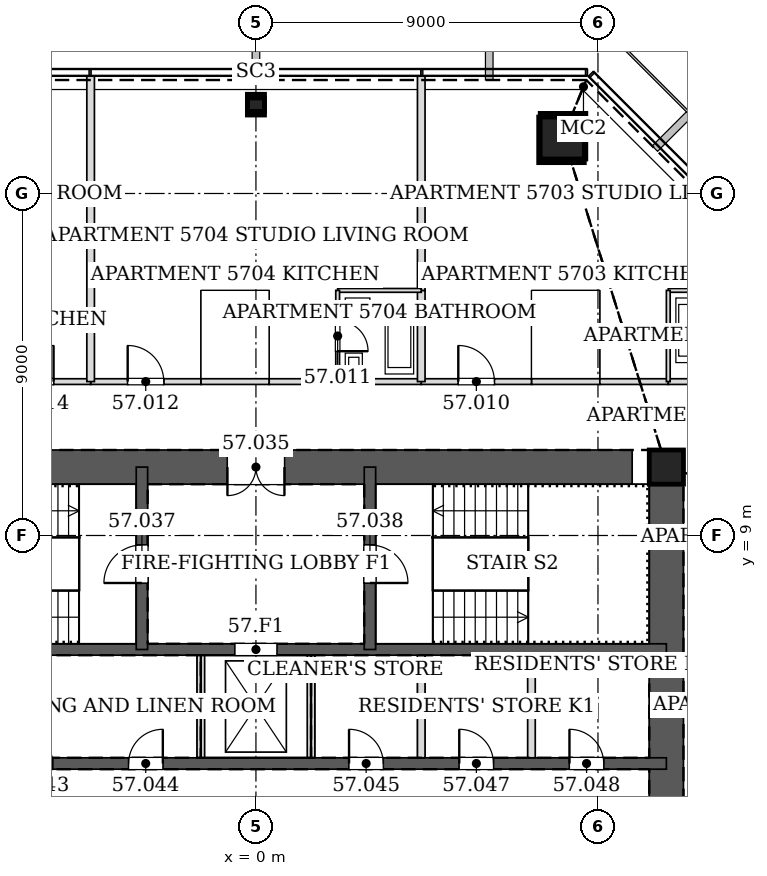
"""IFC4 building model, lengths in metres.
Left out: names, types, materials, properties, quantities, classifications, styles, units other than length and angle.
Written with IfcOpenShell. Run it as: python <this file> out.ifc"""

import sys

from ifc_helpers import new_model, si_unit, direction, frame, frame_2d, origin, origin_2d, place, context, subcontext, project, spatial, rectangle, hollow_rectangle, extrude, element, fill, save


model = new_model("IFC4")
c1 = context("Model", 3, precision=1e-05, world=origin(), true_north=direction((0.0, 1.0)))
c2 = subcontext(c1, "Body", "Model", "MODEL_VIEW")
j1 = project(units=[si_unit("LENGTHUNIT", "METRE"), si_unit("PLANEANGLEUNIT", "RADIAN")], contexts=[c1])
p1 = place(None, origin())
s1 = spatial("IfcSite", under=j1, at=p1, CompositionType="ELEMENT")
p2 = place(p1, origin())
s2 = spatial("IfcBuilding", under=s1, at=p2, CompositionType="ELEMENT")
p3 = place(p2, frame((0.0, 0.0, 241.4)))
s3 = spatial("IfcBuildingStorey", under=s2, at=p3, CompositionType="ELEMENT", Elevation=241.4)
p4 = place(p3, frame((8.08, 19.508, 0.0), z_axis=(-0.011698403216, -0.028277121884, 0.999531666202), x_axis=(0.924045401938, -0.382282742426, 0.0)))
e1 = element("IfcColumn", 1, at=p4, inside=s3, PredefinedType="COLUMN", context=c2, shape_type="SweptSolid", body=[
    extrude(hollow_rectangle(XDim=1.2, YDim=1.2, WallThickness=0.055, at=origin_2d()), origin(), (0.0, 0.0, 1.0), 3.402),
])
p5 = place(p3, frame((0.0, 20.386, 0.0), z_axis=(0.0, -0.028207339906, 0.999602093823), x_axis=(1.0, 0.0, 0.0)))
e2 = element("IfcColumn", 2, at=p5, inside=s3, PredefinedType="COLUMN", context=c2, shape_type="SweptSolid", body=[
    extrude(hollow_rectangle(XDim=0.45, YDim=0.45, WallThickness=0.02, at=origin_2d()), origin(), (0.0, 0.0, 1.0), 3.402),
])
p6 = place(p3, frame((10.8, 10.8, 0.0), z_axis=(0.0, 0.0, 1.0), x_axis=(1.0, 0.0, 0.0)))
e3 = element("IfcColumn", 3, at=p6, inside=s3, PredefinedType="COLUMN", context=c2, shape_type="SweptSolid", body=[
    extrude(hollow_rectangle(XDim=0.9, YDim=0.9, WallThickness=0.04, at=origin_2d()), origin(), (0.0, 0.0, 1.0), 3.4),
])
p7 = place(p3, frame((10.8, -10.8, 0.0), z_axis=(0.0, 0.0, 1.0), x_axis=(0.0, 1.0, 0.0)))
e4 = element("IfcWall", 4, at=p7, inside=s3, PredefinedType="SOLIDWALL", context=c2, shape_type="SweptSolid", body=[
    extrude(rectangle(XDim=21.6, YDim=0.9, at=frame_2d((10.8, 0.0))), origin(), (0.0, 0.0, 1.0), 3.4),
])
p8 = place(p7, frame((11.7, 0.0, 0.0)))
e5 = element("IfcOpeningElement", 5, at=p8, cuts=e4, PredefinedType="OPENING", context=c2, shape_type="SweptSolid", body=[
    extrude(rectangle(XDim=1.2, YDim=2.1, at=frame_2d((0.6, 1.05))), frame((0.0, 0.46, 0.0), z_axis=(0.0, -1.0, 0.0), x_axis=(1.0, 0.0, 0.0)), (0.0, 0.0, 1.0), 0.92),
])
p9 = place(p7, frame((8.7, 0.0, 0.0)))
e6 = element("IfcOpeningElement", 6, at=p9, cuts=e4, PredefinedType="OPENING", context=c2, shape_type="SweptSolid", body=[
    extrude(rectangle(XDim=1.2, YDim=2.1, at=frame_2d((0.6, 1.05))), frame((0.0, 0.46, 0.0), z_axis=(0.0, -1.0, 0.0), x_axis=(1.0, 0.0, 0.0)), (0.0, 0.0, 1.0), 0.92),
])
p10 = place(p3, frame((10.8, 10.8, 0.0), z_axis=(0.0, 0.0, 1.0), x_axis=(-1.0, 0.0, 0.0)))
e7 = element("IfcWall", 7, at=p10, inside=s3, PredefinedType="SOLIDWALL", context=c2, shape_type="SweptSolid", body=[
    extrude(rectangle(XDim=21.6, YDim=0.9, at=frame_2d((10.8, 0.0))), origin(), (0.0, 0.0, 1.0), 3.4),
])
p11 = place(p10, frame((10.05, 0.0, 0.0)))
e8 = element("IfcOpeningElement", 8, at=p11, cuts=e7, PredefinedType="OPENING", context=c2, shape_type="SweptSolid", body=[
    extrude(rectangle(XDim=1.5, YDim=2.1, at=frame_2d((0.75, 1.05))), frame((0.0, 0.46, 0.0), z_axis=(0.0, -1.0, 0.0), x_axis=(1.0, 0.0, 0.0)), (0.0, 0.0, 1.0), 0.92),
])
p12 = place(p3, frame((-10.8, 3.0, 0.0), z_axis=(0.0, 0.0, 1.0), x_axis=(1.0, 0.0, 0.0)))
e9 = element("IfcWall", 9, at=p12, inside=s3, PredefinedType="SOLIDWALL", context=c2, shape_type="SweptSolid", body=[
    extrude(rectangle(XDim=21.6, YDim=0.3, at=frame_2d((10.8, 0.0))), origin(), (0.0, 0.0, 1.0), 3.4),
])
p13 = place(p12, frame((1.65, 0.0, 0.0)))
e10 = element("IfcOpeningElement", 10, at=p13, cuts=e9, PredefinedType="OPENING", context=c2, shape_type="SweptSolid", body=[
    extrude(rectangle(XDim=0.9, YDim=2.1, at=frame_2d((0.45, 1.05))), frame((0.0, 0.16, 0.0), z_axis=(0.0, -1.0, 0.0), x_axis=(1.0, 0.0, 0.0)), (0.0, 0.0, 1.0), 0.32),
])
p14 = place(p12, frame((4.55, 0.0, 0.0)))
e11 = element("IfcOpeningElement", 11, at=p14, cuts=e9, PredefinedType="OPENING", context=c2, shape_type="SweptSolid", body=[
    extrude(rectangle(XDim=0.9, YDim=2.1, at=frame_2d((0.45, 1.05))), frame((0.0, 0.16, 0.0), z_axis=(0.0, -1.0, 0.0), x_axis=(1.0, 0.0, 0.0)), (0.0, 0.0, 1.0), 0.32),
])
p15 = place(p12, frame((7.45, 0.0, 0.0)))
e12 = element("IfcOpeningElement", 12, at=p15, cuts=e9, PredefinedType="OPENING", context=c2, shape_type="SweptSolid", body=[
    extrude(rectangle(XDim=0.9, YDim=2.1, at=frame_2d((0.45, 1.05))), frame((0.0, 0.16, 0.0), z_axis=(0.0, -1.0, 0.0), x_axis=(1.0, 0.0, 0.0)), (0.0, 0.0, 1.0), 0.32),
])
p16 = place(p12, frame((13.25, 0.0, 0.0)))
e13 = element("IfcOpeningElement", 13, at=p16, cuts=e9, PredefinedType="OPENING", context=c2, shape_type="SweptSolid", body=[
    extrude(rectangle(XDim=0.9, YDim=2.1, at=frame_2d((0.45, 1.05))), frame((0.0, 0.16, 0.0), z_axis=(0.0, -1.0, 0.0), x_axis=(1.0, 0.0, 0.0)), (0.0, 0.0, 1.0), 0.32),
])
p17 = place(p12, frame((16.15, 0.0, 0.0)))
e14 = element("IfcOpeningElement", 14, at=p17, cuts=e9, PredefinedType="OPENING", context=c2, shape_type="SweptSolid", body=[
    extrude(rectangle(XDim=0.9, YDim=2.1, at=frame_2d((0.45, 1.05))), frame((0.0, 0.16, 0.0), z_axis=(0.0, -1.0, 0.0), x_axis=(1.0, 0.0, 0.0)), (0.0, 0.0, 1.0), 0.32),
])
p18 = place(p12, frame((19.05, 0.0, 0.0)))
e15 = element("IfcOpeningElement", 15, at=p18, cuts=e9, PredefinedType="OPENING", context=c2, shape_type="SweptSolid", body=[
    extrude(rectangle(XDim=0.9, YDim=2.1, at=frame_2d((0.45, 1.05))), frame((0.0, 0.16, 0.0), z_axis=(0.0, -1.0, 0.0), x_axis=(1.0, 0.0, 0.0)), (0.0, 0.0, 1.0), 0.32),
])
p19 = place(p3, frame((-10.8, 6.0, 0.0), z_axis=(0.0, 0.0, 1.0), x_axis=(1.0, 0.0, 0.0)))
e16 = element("IfcWall", 16, at=p19, inside=s3, PredefinedType="SOLIDWALL", context=c2, shape_type="SweptSolid", body=[
    extrude(rectangle(XDim=21.6, YDim=0.3, at=frame_2d((10.8, 0.0))), origin(), (0.0, 0.0, 1.0), 3.4),
])
p20 = place(p19, frame((10.25, 0.0, 0.0)))
e17 = element("IfcOpeningElement", 17, at=p20, cuts=e16, PredefinedType="OPENING", context=c2, shape_type="SweptSolid", body=[
    extrude(rectangle(XDim=1.1, YDim=2.1, at=frame_2d((0.55, 1.05))), frame((0.0, 0.16, 0.0), z_axis=(0.0, -1.0, 0.0), x_axis=(1.0, 0.0, 0.0)), (0.0, 0.0, 1.0), 0.32),
])
p21 = place(p3, frame((-3.0, 6.0, 0.0), z_axis=(0.0, 0.0, 1.0), x_axis=(0.0, 1.0, 0.0)))
e18 = element("IfcWall", 18, at=p21, inside=s3, PredefinedType="SOLIDWALL", context=c2, shape_type="SweptSolid", body=[
    extrude(rectangle(XDim=4.8, YDim=0.3, at=frame_2d((2.4, 0.0))), origin(), (0.0, 0.0, 1.0), 3.4),
])
p22 = place(p21, frame((1.75, 0.0, 0.0)))
e19 = element("IfcOpeningElement", 19, at=p22, cuts=e18, PredefinedType="OPENING", context=c2, shape_type="SweptSolid", body=[
    extrude(rectangle(XDim=1.0, YDim=2.1, at=frame_2d((0.5, 1.05))), frame((0.0, 0.16, 0.0), z_axis=(0.0, -1.0, 0.0), x_axis=(1.0, 0.0, 0.0)), (0.0, 0.0, 1.0), 0.32),
])
p23 = place(p3, frame((3.0, 6.0, 0.0), z_axis=(0.0, 0.0, 1.0), x_axis=(0.0, 1.0, 0.0)))
e20 = element("IfcWall", 20, at=p23, inside=s3, PredefinedType="SOLIDWALL", context=c2, shape_type="SweptSolid", body=[
    extrude(rectangle(XDim=4.8, YDim=0.3, at=frame_2d((2.4, 0.0))), origin(), (0.0, 0.0, 1.0), 3.4),
])
p24 = place(p23, frame((1.75, 0.0, 0.0)))
e21 = element("IfcOpeningElement", 21, at=p24, cuts=e20, PredefinedType="OPENING", context=c2, shape_type="SweptSolid", body=[
    extrude(rectangle(XDim=1.0, YDim=2.1, at=frame_2d((0.5, 1.05))), frame((0.0, 0.16, 0.0), z_axis=(0.0, -1.0, 0.0), x_axis=(1.0, 0.0, 0.0)), (0.0, 0.0, 1.0), 0.32),
])
p25 = place(p3, frame((13.05, 13.05, 0.0), z_axis=(0.0, 0.0, 1.0), x_axis=(-1.0, 0.0, 0.0)))
e22 = element("IfcWall", 22, at=p25, inside=s3, PredefinedType="PARTITIONING", context=c2, shape_type="SweptSolid", body=[
    extrude(rectangle(XDim=2.201, YDim=0.15, at=frame_2d((1.101, 0.0))), origin(), (0.0, 0.0, 1.0), 2.588),
])
p26 = place(p3, frame((9.051, 13.05, 0.0), z_axis=(0.0, 0.0, 1.0), x_axis=(-1.0, 0.0, 0.0)))
e23 = element("IfcWall", 23, at=p26, inside=s3, PredefinedType="PARTITIONING", context=c2, shape_type="SweptSolid", body=[
    extrude(rectangle(XDim=1.802, YDim=0.15, at=frame_2d((0.901, 0.0))), origin(), (0.0, 0.0, 1.0), 2.662),
])
p27 = place(p3, frame((7.251, 13.05, 0.0), z_axis=(0.0, 0.0, 1.0), x_axis=(-1.0, 0.0, 0.0)))
e24 = element("IfcWall", 24, at=p27, inside=s3, PredefinedType="PARTITIONING", context=c2, shape_type="SweptSolid", body=[
    extrude(rectangle(XDim=2.902, YDim=0.15, at=frame_2d((1.451, 0.0))), origin(), (0.0, 0.0, 1.0), 2.662),
])
p28 = place(p27, frame((0.976, 0.0, 0.0)))
e25 = element("IfcOpeningElement", 25, at=p28, cuts=e24, PredefinedType="OPENING", context=c2, shape_type="SweptSolid", body=[
    extrude(rectangle(XDim=0.95, YDim=2.1, at=frame_2d((0.475, 1.05))), frame((0.0, 0.085, 0.0), z_axis=(0.0, -1.0, 0.0), x_axis=(1.0, 0.0, 0.0)), (0.0, 0.0, 1.0), 0.17),
])
p29 = place(p3, frame((10.851, 13.05, 0.0), z_axis=(0.0, 0.0, 1.0), x_axis=(-1.0, 0.0, 0.0)))
e26 = element("IfcWall", 26, at=p29, inside=s3, PredefinedType="PARTITIONING", context=c2, shape_type="SweptSolid", body=[
    extrude(rectangle(XDim=1.802, YDim=0.15, at=frame_2d((0.901, 0.0))), origin(), (0.0, 0.0, 1.0), 2.349),
])
p30 = place(p3, frame((4.351, 13.05, 0.0), z_axis=(0.0, 0.0, 1.0), x_axis=(-1.0, 0.0, 0.0)))
e27 = element("IfcWall", 27, at=p30, inside=s3, PredefinedType="PARTITIONING", context=c2, shape_type="SweptSolid", body=[
    extrude(rectangle(XDim=2.202, YDim=0.15, at=frame_2d((1.101, 0.0))), origin(), (0.0, 0.0, 1.0), 2.662),
])
p31 = place(p3, frame((0.351, 13.05, 0.0), z_axis=(0.0, 0.0, 1.0), x_axis=(-1.0, 0.0, 0.0)))
e28 = element("IfcWall", 28, at=p31, inside=s3, PredefinedType="PARTITIONING", context=c2, shape_type="SweptSolid", body=[
    extrude(rectangle(XDim=1.802, YDim=0.15, at=frame_2d((0.901, 0.0))), origin(), (0.0, 0.0, 1.0), 2.332),
])
p32 = place(p3, frame((-1.449, 13.05, 0.0), z_axis=(0.0, 0.0, 1.0), x_axis=(-1.0, 0.0, 0.0)))
e29 = element("IfcWall", 29, at=p32, inside=s3, PredefinedType="PARTITIONING", context=c2, shape_type="SweptSolid", body=[
    extrude(rectangle(XDim=2.902, YDim=0.15, at=frame_2d((1.451, 0.0))), origin(), (0.0, 0.0, 1.0), 2.662),
])
p33 = place(p32, frame((0.976, 0.0, 0.0)))
e30 = element("IfcOpeningElement", 30, at=p33, cuts=e29, PredefinedType="OPENING", context=c2, shape_type="SweptSolid", body=[
    extrude(rectangle(XDim=0.95, YDim=2.1, at=frame_2d((0.475, 1.05))), frame((0.0, 0.085, 0.0), z_axis=(0.0, -1.0, 0.0), x_axis=(1.0, 0.0, 0.0)), (0.0, 0.0, 1.0), 0.17),
])
p34 = place(p3, frame((2.151, 13.05, 0.0), z_axis=(0.0, 0.0, 1.0), x_axis=(-1.0, 0.0, 0.0)))
e31 = element("IfcWall", 31, at=p34, inside=s3, PredefinedType="PARTITIONING", context=c2, shape_type="SweptSolid", body=[
    extrude(rectangle(XDim=1.802, YDim=0.15, at=frame_2d((0.901, 0.0))), origin(), (0.0, 0.0, 1.0), 2.662),
])
p35 = place(p3, frame((-4.349, 13.05, 0.0), z_axis=(0.0, 0.0, 1.0), x_axis=(-1.0, 0.0, 0.0)))
e32 = element("IfcWall", 32, at=p35, inside=s3, PredefinedType="PARTITIONING", context=c2, shape_type="SweptSolid", body=[
    extrude(rectangle(XDim=2.902, YDim=0.15, at=frame_2d((1.451, 0.0))), origin(), (0.0, 0.0, 1.0), 2.662),
])
p36 = place(p35, frame((0.976, 0.0, 0.0)))
e33 = element("IfcOpeningElement", 33, at=p36, cuts=e32, PredefinedType="OPENING", context=c2, shape_type="SweptSolid", body=[
    extrude(rectangle(XDim=0.95, YDim=2.1, at=frame_2d((0.475, 1.05))), frame((0.0, 0.085, 0.0), z_axis=(0.0, -1.0, 0.0), x_axis=(1.0, 0.0, 0.0)), (0.0, 0.0, 1.0), 0.17),
])
p37 = place(p3, frame((14.49, 15.45, 0.0), z_axis=(0.0, 0.0, 1.0), x_axis=(-1.0, 0.0, 0.0)))
e34 = element("IfcWall", 34, at=p37, inside=s3, PredefinedType="PARTITIONING", context=c2, shape_type="SweptSolid", body=[
    extrude(rectangle(XDim=3.639, YDim=0.1, at=frame_2d((1.82, 0.0))), origin(), (0.0, 0.0, 1.0), 2.784),
])
p38 = place(p37, frame((1.223, 0.0, 0.0)))
e35 = element("IfcOpeningElement", 35, at=p38, cuts=e34, PredefinedType="OPENING", context=c2, shape_type="SweptSolid", body=[
    extrude(rectangle(XDim=0.8, YDim=2.1, at=frame_2d((0.4, 1.05))), frame((0.0, 0.06, 0.0), z_axis=(0.0, -1.0, 0.0), x_axis=(1.0, 0.0, 0.0)), (0.0, 0.0, 1.0), 0.12),
])
p39 = place(p3, frame((10.85, 15.45, 0.0), z_axis=(0.0, 0.0, 1.0), x_axis=(0.0, -1.0, 0.0)))
e36 = element("IfcWall", 36, at=p39, inside=s3, PredefinedType="PARTITIONING", context=c2, shape_type="SweptSolid", body=[
    extrude(rectangle(XDim=2.4, YDim=0.1, at=frame_2d((1.2, 0.0))), origin(), (0.0, 0.0, 1.0), 2.786),
])
p40 = place(p3, frame((4.35, 15.451, 0.0), z_axis=(0.0, 0.0, 1.0), x_axis=(0.0, -1.0, 0.0)))
e37 = element("IfcWall", 37, at=p40, inside=s3, PredefinedType="PARTITIONING", context=c2, shape_type="SweptSolid", body=[
    extrude(rectangle(XDim=2.401, YDim=0.2, at=frame_2d((1.2, 0.0))), origin(), (0.0, 0.0, 1.0), 2.662),
])
p41 = place(p3, frame((4.35, 21.091, 0.0), z_axis=(0.0, 0.0, 1.0), x_axis=(0.0, -1.0, 0.0)))
e38 = element("IfcWall", 38, at=p41, inside=s3, PredefinedType="PARTITIONING", context=c2, shape_type="SweptSolid", body=[
    extrude(rectangle(XDim=5.642, YDim=0.2, at=frame_2d((2.821, 0.0))), origin(), (0.0, 0.0, 1.0), 2.662),
])
p42 = place(p3, frame((4.35, 15.45, 0.0), z_axis=(0.0, 0.0, 1.0), x_axis=(-1.0, 0.0, 0.0)))
e39 = element("IfcWall", 39, at=p42, inside=s3, PredefinedType="PARTITIONING", context=c2, shape_type="SweptSolid", body=[
    extrude(rectangle(XDim=2.2, YDim=0.1, at=frame_2d((1.1, 0.0))), origin(), (0.0, 0.0, 1.0), 2.784),
])
p43 = place(p3, frame((2.15, 15.45, 0.0), z_axis=(0.0, 0.0, 1.0), x_axis=(0.0, -1.0, 0.0)))
e40 = element("IfcWall", 40, at=p43, inside=s3, PredefinedType="PARTITIONING", context=c2, shape_type="SweptSolid", body=[
    extrude(rectangle(XDim=2.4, YDim=0.1, at=frame_2d((1.2, 0.0))), origin(), (0.0, 0.0, 1.0), 2.662),
])
p44 = place(p43, frame((0.8, 0.0, 0.0)))
e41 = element("IfcOpeningElement", 41, at=p44, cuts=e40, PredefinedType="OPENING", context=c2, shape_type="SweptSolid", body=[
    extrude(rectangle(XDim=0.8, YDim=2.1, at=frame_2d((0.4, 1.05))), frame((0.0, 0.06, 0.0), z_axis=(0.0, -1.0, 0.0), x_axis=(1.0, 0.0, 0.0)), (0.0, 0.0, 1.0), 0.12),
])
p45 = place(p3, frame((-4.35, 21.091, 0.0), z_axis=(0.0, 0.0, 1.0), x_axis=(0.0, -1.0, 0.0)))
e42 = element("IfcWall", 42, at=p45, inside=s3, PredefinedType="PARTITIONING", context=c2, shape_type="SweptSolid", body=[
    extrude(rectangle(XDim=8.041, YDim=0.2, at=frame_2d((4.021, 0.0))), origin(), (0.0, 0.0, 1.0), 2.662),
])
for number, where, z_axis, x_axis in (
    (43, (-1.45, 3.15, 0.0), (0.0, 0.0, 1.0), (0.0, 1.0, 0.0)),
    (44, (1.45, 3.15, 0.0), (0.0, 0.0, 1.0), (0.0, 1.0, 0.0)),
    (45, (4.35, 3.15, 0.0), (0.0, 0.0, 1.0), (0.0, 1.0, 0.0)),
    (46, (7.25, 3.15, 0.0), (0.0, 0.0, 1.0), (0.0, 1.0, 0.0)),
):
    element("IfcWall", number, at=place(p3, frame(where, z_axis=z_axis, x_axis=x_axis)), inside=s3, PredefinedType="PARTITIONING", context=c2, shape_type="SweptSolid", body=[
        extrude(rectangle(XDim=2.7, YDim=0.2, at=frame_2d((1.35, 0.0))), origin(), (0.0, 0.0, 1.0), 3.2),
    ])
p46 = place(p28, frame((0.95, 0.0, 0.0), z_axis=(0.0, 0.0, 1.0), x_axis=(-1.0, 0.0, 0.0)))
e47 = element("IfcDoor", 47, at=p46, inside=s3, OperationType="SINGLE_SWING_LEFT", PredefinedType="DOOR", context=c2, shape_type="SweptSolid", body=[
    extrude(rectangle(XDim=0.95, YDim=2.1, at=frame_2d((0.475, 1.05))), frame((0.0, 0.025, 0.0), z_axis=(0.0, -1.0, 0.0), x_axis=(1.0, 0.0, 0.0)), (0.0, 0.0, 1.0), 0.05),
])
fill(e25, e47)
p47 = place(p44, origin())
e48 = element("IfcDoor", 48, at=p47, inside=s3, OperationType="SINGLE_SWING_RIGHT", PredefinedType="DOOR", context=c2, shape_type="SweptSolid", body=[
    extrude(rectangle(XDim=0.8, YDim=2.1, at=frame_2d((0.4, 1.05))), frame((0.0, 0.025, 0.0), z_axis=(0.0, -1.0, 0.0), x_axis=(1.0, 0.0, 0.0)), (0.0, 0.0, 1.0), 0.05),
])
fill(e41, e48)
p48 = place(p33, frame((0.95, 0.0, 0.0), z_axis=(0.0, 0.0, 1.0), x_axis=(-1.0, 0.0, 0.0)))
e49 = element("IfcDoor", 49, at=p48, inside=s3, OperationType="SINGLE_SWING_LEFT", PredefinedType="DOOR", context=c2, shape_type="SweptSolid", body=[
    extrude(rectangle(XDim=0.95, YDim=2.1, at=frame_2d((0.475, 1.05))), frame((0.0, 0.025, 0.0), z_axis=(0.0, -1.0, 0.0), x_axis=(1.0, 0.0, 0.0)), (0.0, 0.0, 1.0), 0.05),
])
fill(e30, e49)
p49 = place(p36, frame((0.95, 0.0, 0.0), z_axis=(0.0, 0.0, 1.0), x_axis=(-1.0, 0.0, 0.0)))
e50 = element("IfcDoor", 50, at=p49, inside=s3, OperationType="SINGLE_SWING_RIGHT", PredefinedType="DOOR", context=c2, shape_type="SweptSolid", body=[
    extrude(rectangle(XDim=0.95, YDim=2.1, at=frame_2d((0.475, 1.05))), frame((0.0, 0.025, 0.0), z_axis=(0.0, -1.0, 0.0), x_axis=(1.0, 0.0, 0.0)), (0.0, 0.0, 1.0), 0.05),
])
fill(e33, e50)
p50 = place(p11, origin())
e51 = element("IfcDoor", 51, at=p50, inside=s3, OperationType="DOUBLE_DOOR_SINGLE_SWING", PredefinedType="DOOR", context=c2, shape_type="SweptSolid", body=[
    extrude(rectangle(XDim=1.5, YDim=2.1, at=frame_2d((0.75, 1.05))), frame((0.0, 0.025, 0.0), z_axis=(0.0, -1.0, 0.0), x_axis=(1.0, 0.0, 0.0)), (0.0, 0.0, 1.0), 0.05),
])
fill(e8, e51)
p51 = place(p22, origin())
e52 = element("IfcDoor", 52, at=p51, inside=s3, OperationType="SINGLE_SWING_LEFT", PredefinedType="DOOR", context=c2, shape_type="SweptSolid", body=[
    extrude(rectangle(XDim=1.0, YDim=2.1, at=frame_2d((0.5, 1.05))), frame((0.0, 0.025, 0.0), z_axis=(0.0, -1.0, 0.0), x_axis=(1.0, 0.0, 0.0)), (0.0, 0.0, 1.0), 0.05),
])
fill(e19, e52)
p52 = place(p24, frame((1.0, 0.0, 0.0), z_axis=(0.0, 0.0, 1.0), x_axis=(-1.0, 0.0, 0.0)))
e53 = element("IfcDoor", 53, at=p52, inside=s3, OperationType="SINGLE_SWING_RIGHT", PredefinedType="DOOR", context=c2, shape_type="SweptSolid", body=[
    extrude(rectangle(XDim=1.0, YDim=2.1, at=frame_2d((0.5, 1.05))), frame((0.0, 0.025, 0.0), z_axis=(0.0, -1.0, 0.0), x_axis=(1.0, 0.0, 0.0)), (0.0, 0.0, 1.0), 0.05),
])
fill(e21, e53)
p53 = place(p15, origin())
e54 = element("IfcDoor", 54, at=p53, inside=s3, OperationType="SINGLE_SWING_RIGHT", PredefinedType="DOOR", context=c2, shape_type="SweptSolid", body=[
    extrude(rectangle(XDim=0.9, YDim=2.1, at=frame_2d((0.45, 1.05))), frame((0.0, 0.025, 0.0), z_axis=(0.0, -1.0, 0.0), x_axis=(1.0, 0.0, 0.0)), (0.0, 0.0, 1.0), 0.05),
])
fill(e12, e54)
p54 = place(p16, origin())
e55 = element("IfcDoor", 55, at=p54, inside=s3, OperationType="SINGLE_SWING_LEFT", PredefinedType="DOOR", context=c2, shape_type="SweptSolid", body=[
    extrude(rectangle(XDim=0.9, YDim=2.1, at=frame_2d((0.45, 1.05))), frame((0.0, 0.025, 0.0), z_axis=(0.0, -1.0, 0.0), x_axis=(1.0, 0.0, 0.0)), (0.0, 0.0, 1.0), 0.05),
])
fill(e13, e55)
p55 = place(p17, origin())
e56 = element("IfcDoor", 56, at=p55, inside=s3, OperationType="SINGLE_SWING_LEFT", PredefinedType="DOOR", context=c2, shape_type="SweptSolid", body=[
    extrude(rectangle(XDim=0.9, YDim=2.1, at=frame_2d((0.45, 1.05))), frame((0.0, 0.025, 0.0), z_axis=(0.0, -1.0, 0.0), x_axis=(1.0, 0.0, 0.0)), (0.0, 0.0, 1.0), 0.05),
])
fill(e14, e56)
p56 = place(p18, origin())
e57 = element("IfcDoor", 57, at=p56, inside=s3, OperationType="SINGLE_SWING_LEFT", PredefinedType="DOOR", context=c2, shape_type="SweptSolid", body=[
    extrude(rectangle(XDim=0.9, YDim=2.1, at=frame_2d((0.45, 1.05))), frame((0.0, 0.025, 0.0), z_axis=(0.0, -1.0, 0.0), x_axis=(1.0, 0.0, 0.0)), (0.0, 0.0, 1.0), 0.05),
])
fill(e15, e57)
p57 = place(p20, origin())
e58 = element("IfcDoor", 58, at=p57, inside=s3, OperationType="DOUBLE_DOOR_SLIDING", PredefinedType="DOOR", context=c2, shape_type="SweptSolid", body=[
    extrude(rectangle(XDim=1.1, YDim=2.1, at=frame_2d((0.55, 1.05))), frame((0.0, 0.025, 0.0), z_axis=(0.0, -1.0, 0.0), x_axis=(1.0, 0.0, 0.0)), (0.0, 0.0, 1.0), 0.05),
])
fill(e17, e58)
save(model, sys.argv[1])
